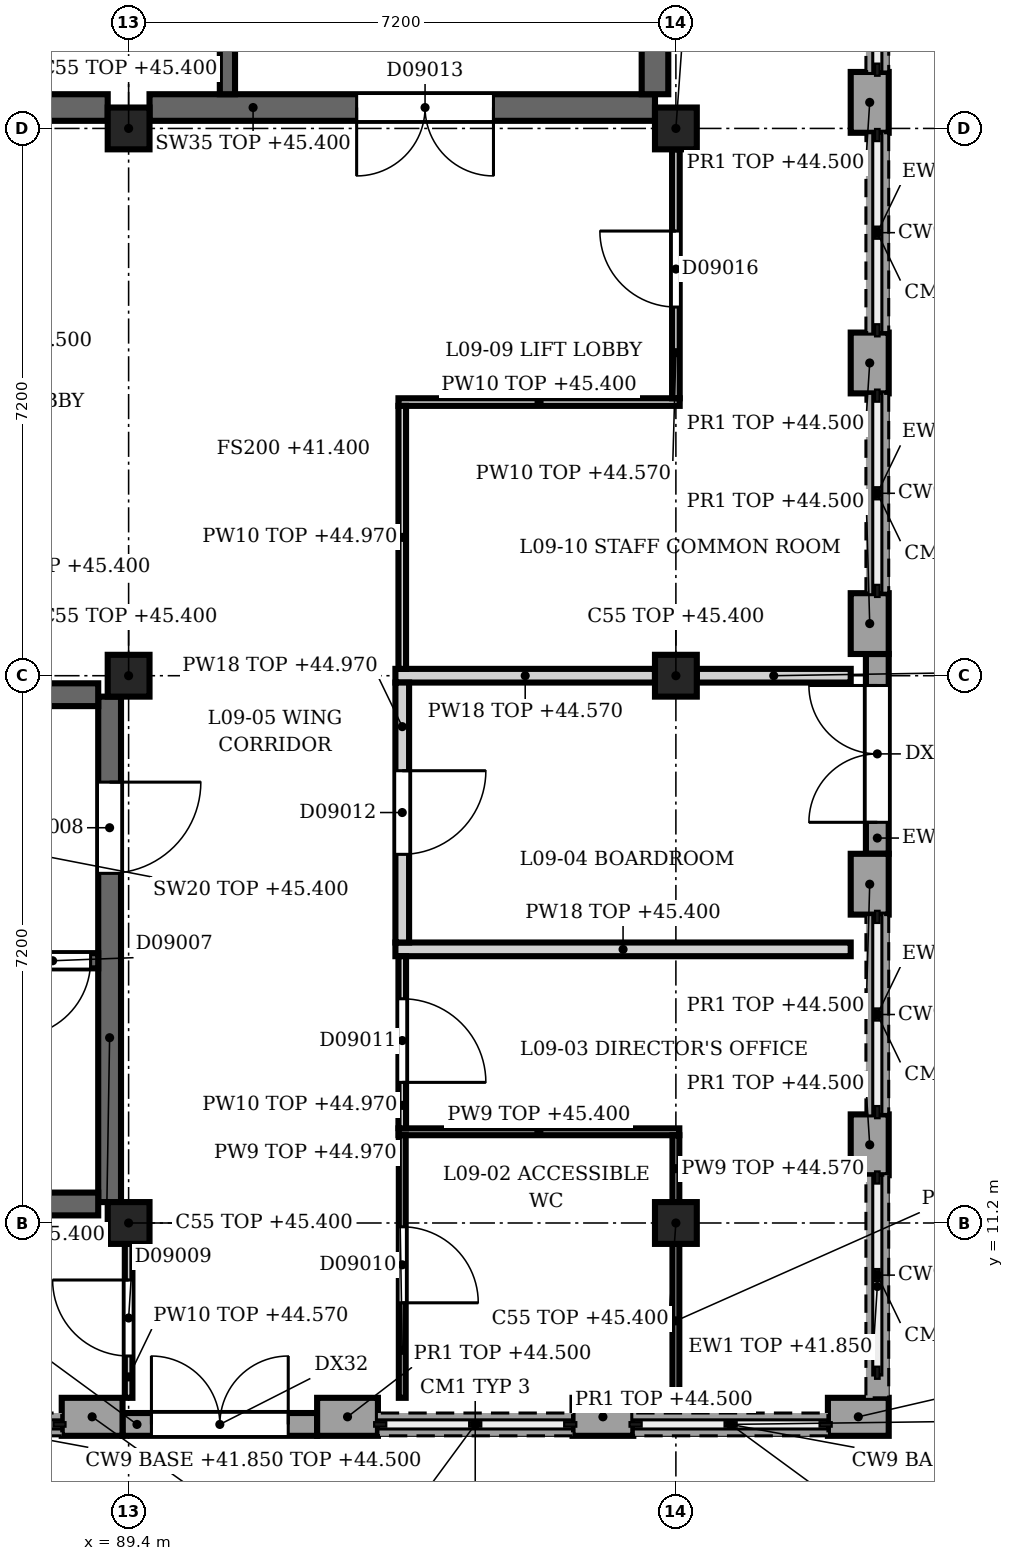
"""IFC4 building model, lengths in metres.
Left out: names, types, materials, properties, quantities, classifications, styles, units other than length and angle.
Written with IfcOpenShell. Run it as: python <this file> out.ifc"""

import sys

from ifc_helpers import new_model, si_unit, direction, frame, frame_2d, origin, origin_2d, place, context, subcontext, project, spatial, rectangle, extrude, element, fill, save


model = new_model("IFC4")
c1 = context("Model", 3, precision=1e-05, world=origin(), true_north=direction((0.0, 1.0)))
c2 = subcontext(c1, "Body", "Model", "MODEL_VIEW")
j1 = project(units=[si_unit("LENGTHUNIT", "METRE"), si_unit("PLANEANGLEUNIT", "RADIAN")], contexts=[c1])
p1 = place(None, origin())
s1 = spatial("IfcSite", under=j1, at=p1, CompositionType="ELEMENT")
p2 = place(p1, origin())
s2 = spatial("IfcBuilding", under=s1, at=p2, CompositionType="ELEMENT")
p3 = place(p2, frame((0.0, 0.0, 41.4)))
s3 = spatial("IfcBuildingStorey", under=s2, at=p3, CompositionType="ELEMENT", Elevation=41.4)
for number, where, z_axis, x_axis in (
    (1, (89.4, 11.2, 0.0), (0.0, 0.0, 1.0), (1.0, 0.0, 0.0)),
    (2, (89.4, 18.4, 0.0), (0.0, 0.0, 1.0), (1.0, 0.0, 0.0)),
    (3, (89.4, 25.6, 0.0), (0.0, 0.0, 1.0), (1.0, 0.0, 0.0)),
    (4, (96.6, 11.2, 0.0), (0.0, 0.0, 1.0), (1.0, 0.0, 0.0)),
    (5, (96.6, 18.4, 0.0), (0.0, 0.0, 1.0), (1.0, 0.0, 0.0)),
    (6, (96.6, 25.6, 0.0), (0.0, 0.0, 1.0), (1.0, 0.0, 0.0)),
):
    element("IfcColumn", number, at=place(p3, frame(where, z_axis=z_axis, x_axis=x_axis)), inside=s3, PredefinedType="COLUMN", context=c2, shape_type="SweptSolid", body=[
        extrude(rectangle(XDim=0.55, YDim=0.55, at=origin_2d()), origin(), (0.0, 0.0, 1.0), 4.0),
    ])
for number, where, z_axis, x_axis in (
    (7, (99.15, 26.343, 0.0), (0.0, 0.0, 1.0), (0.0, -1.0, 0.0)),
    (8, (99.15, 22.914, 0.0), (0.0, 0.0, 1.0), (0.0, -1.0, 0.0)),
):
    element("IfcWall", number, at=place(p3, frame(where, z_axis=z_axis, x_axis=x_axis)), inside=s3, PredefinedType="SOLIDWALL", context=c2, shape_type="SweptSolid", body=[
        extrude(rectangle(XDim=0.8, YDim=0.5, at=frame_2d((0.4, 0.0))), origin(), (0.0, 0.0, 1.0), 3.1),
    ])
p4 = place(p3, frame((99.15, 19.486, 0.0), z_axis=(0.0, 0.0, 1.0), x_axis=(0.0, -1.0, 0.0)))
e9 = element("IfcWall", 9, at=p4, inside=s3, PredefinedType="SOLIDWALL", context=c2, shape_type="SweptSolid", body=[
    extrude(rectangle(XDim=0.8, YDim=0.5, at=frame_2d((0.4, 0.0))), origin(), (0.0, 0.0, 1.0), 3.1),
])
for number, where, z_axis, x_axis in (
    (10, (99.15, 16.057, 0.0), (0.0, 0.0, 1.0), (0.0, -1.0, 0.0)),
    (11, (99.15, 12.629, 0.0), (0.0, 0.0, 1.0), (0.0, -1.0, 0.0)),
):
    element("IfcWall", number, at=place(p3, frame(where, z_axis=z_axis, x_axis=x_axis)), inside=s3, PredefinedType="SOLIDWALL", context=c2, shape_type="SweptSolid", body=[
        extrude(rectangle(XDim=0.8, YDim=0.5, at=frame_2d((0.4, 0.0))), origin(), (0.0, 0.0, 1.0), 3.1),
    ])
p5 = place(p3, frame((99.25, 28.971, 0.0), z_axis=(0.0, 0.0, 1.0), x_axis=(0.0, -1.0, 0.0)))
e12 = element("IfcWall", 12, at=p5, inside=s3, PredefinedType="SOLIDWALL", context=c2, shape_type="SweptSolid", body=[
    extrude(rectangle(XDim=2.628, YDim=0.3, at=frame_2d((1.314, 0.0))), origin(), (0.0, 0.0, 1.0), 0.45),
])
for number, where, z_axis, x_axis in (
    (13, (99.25, 25.543, 0.0), (0.0, 0.0, 1.0), (0.0, -1.0, 0.0)),
    (14, (99.25, 22.114, 0.0), (0.0, 0.0, 1.0), (0.0, -1.0, 0.0)),
):
    element("IfcWall", number, at=place(p3, frame(where, z_axis=z_axis, x_axis=x_axis)), inside=s3, PredefinedType="SOLIDWALL", context=c2, shape_type="SweptSolid", body=[
        extrude(rectangle(XDim=2.629, YDim=0.3, at=frame_2d((1.314, 0.0))), origin(), (0.0, 0.0, 1.0), 0.45),
    ])
p6 = place(p3, frame((99.25, 18.686, 0.0), z_axis=(0.0, 0.0, 1.0), x_axis=(0.0, -1.0, 0.0)))
e15 = element("IfcWall", 15, at=p6, inside=s3, PredefinedType="SOLIDWALL", context=c2, shape_type="SweptSolid", body=[
    extrude(rectangle(XDim=2.629, YDim=0.3, at=frame_2d((1.314, 0.0))), origin(), (0.0, 0.0, 1.0), 3.1),
])
p7 = place(p6, frame((0.414, 0.0, 0.0)))
e16 = element("IfcOpeningElement", 16, at=p7, cuts=e15, PredefinedType="OPENING", context=c2, shape_type="SweptSolid", body=[
    extrude(rectangle(XDim=1.8, YDim=2.4, at=frame_2d((0.9, 1.2))), frame((0.0, 0.16, 0.0), z_axis=(0.0, -1.0, 0.0), x_axis=(1.0, 0.0, 0.0)), (0.0, 0.0, 1.0), 0.32),
])
p8 = place(p3, frame((99.25, 15.257, 0.0), z_axis=(0.0, 0.0, 1.0), x_axis=(0.0, -1.0, 0.0)))
e17 = element("IfcWall", 17, at=p8, inside=s3, PredefinedType="SOLIDWALL", context=c2, shape_type="SweptSolid", body=[
    extrude(rectangle(XDim=2.628, YDim=0.3, at=frame_2d((1.314, 0.0))), origin(), (0.0, 0.0, 1.0), 0.45),
])
p9 = place(p3, frame((99.25, 11.829, 0.0), z_axis=(0.0, 0.0, 1.0), x_axis=(0.0, -1.0, 0.0)))
e18 = element("IfcWall", 18, at=p9, inside=s3, PredefinedType="SOLIDWALL", context=c2, shape_type="SweptSolid", body=[
    extrude(rectangle(XDim=2.929, YDim=0.3, at=frame_2d((1.464, 0.0))), origin(), (0.0, 0.0, 1.0), 0.45),
])
p10 = place(p3, frame((99.4, 8.65, 0.0), z_axis=(0.0, 0.0, 1.0), x_axis=(-1.0, 0.0, 0.0)))
e19 = element("IfcWall", 19, at=p10, inside=s3, PredefinedType="SOLIDWALL", context=c2, shape_type="SweptSolid", body=[
    extrude(rectangle(XDim=0.8, YDim=0.5, at=frame_2d((0.4, 0.0))), origin(), (0.0, 0.0, 1.0), 3.1),
])
for number, where, z_axis, x_axis in (
    (20, (96.04, 8.65, 0.0), (0.0, 0.0, 1.0), (-1.0, 0.0, 0.0)),
    (21, (92.68, 8.65, 0.0), (0.0, 0.0, 1.0), (-1.0, 0.0, 0.0)),
    (22, (89.32, 8.65, 0.0), (0.0, 0.0, 1.0), (-1.0, 0.0, 0.0)),
):
    element("IfcWall", number, at=place(p3, frame(where, z_axis=z_axis, x_axis=x_axis)), inside=s3, PredefinedType="SOLIDWALL", context=c2, shape_type="SweptSolid", body=[
        extrude(rectangle(XDim=0.8, YDim=0.5, at=frame_2d((0.4, 0.0))), origin(), (0.0, 0.0, 1.0), 3.1),
    ])
for number, where, z_axis, x_axis in (
    (23, (98.6, 8.55, 0.0), (0.0, 0.0, 1.0), (-1.0, 0.0, 0.0)),
    (24, (95.24, 8.55, 0.0), (0.0, 0.0, 1.0), (-1.0, 0.0, 0.0)),
):
    element("IfcWall", number, at=place(p3, frame(where, z_axis=z_axis, x_axis=x_axis)), inside=s3, PredefinedType="SOLIDWALL", context=c2, shape_type="SweptSolid", body=[
        extrude(rectangle(XDim=2.56, YDim=0.3, at=frame_2d((1.28, 0.0))), origin(), (0.0, 0.0, 1.0), 0.45),
    ])
p11 = place(p3, frame((91.88, 8.55, 0.0), z_axis=(0.0, 0.0, 1.0), x_axis=(-1.0, 0.0, 0.0)))
e25 = element("IfcWall", 25, at=p11, inside=s3, PredefinedType="SOLIDWALL", context=c2, shape_type="SweptSolid", body=[
    extrude(rectangle(XDim=2.56, YDim=0.3, at=frame_2d((1.28, 0.0))), origin(), (0.0, 0.0, 1.0), 3.1),
])
p12 = place(p11, frame((0.38, 0.0, 0.0)))
e26 = element("IfcOpeningElement", 26, at=p12, cuts=e25, PredefinedType="OPENING", context=c2, shape_type="SweptSolid", body=[
    extrude(rectangle(XDim=1.8, YDim=2.4, at=frame_2d((0.9, 1.2))), frame((0.0, 0.16, 0.0), z_axis=(0.0, -1.0, 0.0), x_axis=(1.0, 0.0, 0.0)), (0.0, 0.0, 1.0), 0.32),
])
p13 = place(p3, frame((88.52, 8.55, 0.0), z_axis=(0.0, 0.0, 1.0), x_axis=(-1.0, 0.0, 0.0)))
e27 = element("IfcWall", 27, at=p13, inside=s3, PredefinedType="SOLIDWALL", context=c2, shape_type="SweptSolid", body=[
    extrude(rectangle(XDim=2.56, YDim=0.3, at=frame_2d((1.28, 0.0))), origin(), (0.0, 0.0, 1.0), 0.45),
])
p14 = place(p3, frame((82.35, 25.875, 0.0), z_axis=(0.0, 0.0, 1.0), x_axis=(1.0, 0.0, 0.0)))
e28 = element("IfcWall", 28, at=p14, inside=s3, PredefinedType="SHEAR", context=c2, shape_type="SweptSolid", body=[
    extrude(rectangle(XDim=6.775, YDim=0.35, at=frame_2d((3.387, 0.0))), origin(), (0.0, 0.0, 1.0), 4.0),
])
p15 = place(p14, frame((4.05, 0.0, 0.0)))
e29 = element("IfcOpeningElement", 29, at=p15, cuts=e28, PredefinedType="OPENING", context=c2, shape_type="SweptSolid", body=[
    extrude(rectangle(XDim=1.2, YDim=2.1, at=frame_2d((0.6, 1.05))), frame((0.0, 0.185, 0.0), z_axis=(0.0, -1.0, 0.0), x_axis=(1.0, 0.0, 0.0)), (0.0, 0.0, 1.0), 0.37),
])
p16 = place(p3, frame((89.675, 25.875, 0.0), z_axis=(0.0, 0.0, 1.0), x_axis=(1.0, 0.0, 0.0)))
e30 = element("IfcWall", 30, at=p16, inside=s3, PredefinedType="SHEAR", context=c2, shape_type="SweptSolid", body=[
    extrude(rectangle(XDim=6.65, YDim=0.35, at=frame_2d((3.325, 0.0))), origin(), (0.0, 0.0, 1.0), 4.0),
])
p17 = place(p16, frame((2.725, 0.0, 0.0)))
e31 = element("IfcOpeningElement", 31, at=p17, cuts=e30, PredefinedType="OPENING", context=c2, shape_type="SweptSolid", body=[
    extrude(rectangle(XDim=1.8, YDim=2.1, at=frame_2d((0.9, 1.05))), frame((0.0, 0.185, 0.0), z_axis=(0.0, -1.0, 0.0), x_axis=(1.0, 0.0, 0.0)), (0.0, 0.0, 1.0), 0.37),
])
p18 = place(p3, frame((96.325, 26.05, 0.0), z_axis=(0.0, 0.0, 1.0), x_axis=(0.0, 1.0, 0.0)))
e32 = element("IfcWall", 32, at=p18, inside=s3, PredefinedType="SHEAR", context=c2, shape_type="SweptSolid", body=[
    extrude(rectangle(XDim=6.3, YDim=0.35, at=frame_2d((3.15, 0.0))), origin(), (0.0, 0.0, 1.0), 4.0),
])
p19 = place(p3, frame((90.7, 26.05, 0.0), z_axis=(0.0, 0.0, 1.0), x_axis=(0.0, 1.0, 0.0)))
e33 = element("IfcWall", 33, at=p19, inside=s3, PredefinedType="SHEAR", context=c2, shape_type="SweptSolid", body=[
    extrude(rectangle(XDim=3.05, YDim=0.2, at=frame_2d((1.525, 0.0))), origin(), (0.0, 0.0, 1.0), 4.0),
])
p20 = place(p3, frame((89.15, 11.475, 0.0), z_axis=(0.0, 0.0, 1.0), x_axis=(0.0, 1.0, 0.0)))
e34 = element("IfcWall", 34, at=p20, inside=s3, PredefinedType="SHEAR", context=c2, shape_type="SweptSolid", body=[
    extrude(rectangle(XDim=6.65, YDim=0.3, at=frame_2d((3.325, 0.0))), origin(), (0.0, 0.0, 1.0), 4.0),
])
p21 = place(p20, frame((4.325, 0.0, 0.0)))
e35 = element("IfcOpeningElement", 35, at=p21, cuts=e34, PredefinedType="OPENING", context=c2, shape_type="SweptSolid", body=[
    extrude(rectangle(XDim=1.2, YDim=2.1, at=frame_2d((0.6, 1.05))), frame((0.0, 0.16, 0.0), z_axis=(0.0, -1.0, 0.0), x_axis=(1.0, 0.0, 0.0)), (0.0, 0.0, 1.0), 0.32),
])
for number, where, z_axis, x_axis in (
    (36, (82.6, 11.45, 0.0), (0.0, 0.0, 1.0), (1.0, 0.0, 0.0)),
    (37, (82.6, 18.15, 0.0), (0.0, 0.0, 1.0), (1.0, 0.0, 0.0)),
):
    element("IfcWall", number, at=place(p3, frame(where, z_axis=z_axis, x_axis=x_axis)), inside=s3, PredefinedType="SHEAR", context=c2, shape_type="SweptSolid", body=[
        extrude(rectangle(XDim=6.4, YDim=0.3, at=frame_2d((3.2, 0.0))), origin(), (0.0, 0.0, 1.0), 4.0),
    ])
p22 = place(p3, frame((89.0, 14.65, 0.0), z_axis=(0.0, 0.0, 1.0), x_axis=(-1.0, 0.0, 0.0)))
e38 = element("IfcWall", 38, at=p22, inside=s3, PredefinedType="SHEAR", context=c2, shape_type="SweptSolid", body=[
    extrude(rectangle(XDim=6.4, YDim=0.2, at=frame_2d((3.2, 0.0))), origin(), (0.0, 0.0, 1.0), 4.0),
])
p23 = place(p22, frame((0.1, 0.0, 0.0)))
e39 = element("IfcOpeningElement", 39, at=p23, cuts=e38, PredefinedType="OPENING", context=c2, shape_type="SweptSolid", body=[
    extrude(rectangle(XDim=1.0, YDim=2.1, at=frame_2d((0.5, 1.05))), frame((0.0, 0.11, 0.0), z_axis=(0.0, -1.0, 0.0), x_axis=(1.0, 0.0, 0.0)), (0.0, 0.0, 1.0), 0.22),
])
p24 = place(p3, frame((92.95, 12.4, 0.0), z_axis=(0.0, 0.0, 1.0), x_axis=(1.0, 0.0, 0.0)))
e40 = element("IfcWall", 40, at=p24, inside=s3, PredefinedType="PARTITIONING", context=c2, shape_type="SweptSolid", body=[
    extrude(rectangle(XDim=3.695, YDim=0.09, at=frame_2d((1.848, 0.0))), origin(), (0.0, 0.0, 1.0), 4.0),
])
p25 = place(p3, frame((92.91, 14.8, 0.0), z_axis=(0.0, 0.0, 1.0), x_axis=(1.0, 0.0, 0.0)))
e41 = element("IfcWall", 41, at=p25, inside=s3, PredefinedType="PARTITIONING", context=c2, shape_type="SweptSolid", body=[
    extrude(rectangle(XDim=5.99, YDim=0.18, at=frame_2d((2.995, 0.0))), origin(), (0.0, 0.0, 1.0), 4.0),
])
p26 = place(p3, frame((92.91, 18.4, 0.0), z_axis=(0.0, 0.0, 1.0), x_axis=(1.0, 0.0, 0.0)))
e42 = element("IfcWall", 42, at=p26, inside=s3, PredefinedType="PARTITIONING", context=c2, shape_type="SweptSolid", body=[
    extrude(rectangle(XDim=3.415, YDim=0.18, at=frame_2d((1.708, 0.0))), origin(), (0.0, 0.0, 1.0), 3.17),
])
p27 = place(p3, frame((96.875, 18.4, 0.0), z_axis=(0.0, 0.0, 1.0), x_axis=(1.0, 0.0, 0.0)))
e43 = element("IfcWall", 43, at=p27, inside=s3, PredefinedType="PARTITIONING", context=c2, shape_type="SweptSolid", body=[
    extrude(rectangle(XDim=2.025, YDim=0.18, at=frame_2d((1.012, 0.0))), origin(), (0.0, 0.0, 1.0), 3.17),
])
p28 = place(p3, frame((92.95, 22.0, 0.0), z_axis=(0.0, 0.0, 1.0), x_axis=(1.0, 0.0, 0.0)))
e44 = element("IfcWall", 44, at=p28, inside=s3, PredefinedType="PARTITIONING", context=c2, shape_type="SweptSolid", body=[
    extrude(rectangle(XDim=3.7, YDim=0.1, at=frame_2d((1.85, 0.0))), origin(), (0.0, 0.0, 1.0), 4.0),
])
p29 = place(p3, frame((89.4, 8.9, 0.0), z_axis=(0.0, 0.0, 1.0), x_axis=(0.0, 1.0, 0.0)))
e45 = element("IfcWall", 45, at=p29, inside=s3, PredefinedType="PARTITIONING", context=c2, shape_type="SweptSolid", body=[
    extrude(rectangle(XDim=2.025, YDim=0.1, at=frame_2d((1.013, 0.0))), origin(), (0.0, 0.0, 1.0), 3.17),
])
p30 = place(p29, frame((0.55, 0.0, 0.0)))
e46 = element("IfcOpeningElement", 46, at=p30, cuts=e45, PredefinedType="OPENING", context=c2, shape_type="SweptSolid", body=[
    extrude(rectangle(XDim=1.0, YDim=2.1, at=frame_2d((0.5, 1.05))), frame((0.0, 0.06, 0.0), z_axis=(0.0, -1.0, 0.0), x_axis=(1.0, 0.0, 0.0)), (0.0, 0.0, 1.0), 0.12),
])
p31 = place(p3, frame((93.0, 12.355, 0.0), z_axis=(0.0, 0.0, 1.0), x_axis=(0.0, -1.0, 0.0)))
e47 = element("IfcWall", 47, at=p31, inside=s3, PredefinedType="PARTITIONING", context=c2, shape_type="SweptSolid", body=[
    extrude(rectangle(XDim=3.455, YDim=0.09, at=frame_2d((1.728, 0.0))), origin(), (0.0, 0.0, 1.0), 3.57),
])
p32 = place(p31, frame((1.205, 0.0, 0.0)))
e48 = element("IfcOpeningElement", 48, at=p32, cuts=e47, PredefinedType="OPENING", context=c2, shape_type="SweptSolid", body=[
    extrude(rectangle(XDim=1.0, YDim=2.2, at=frame_2d((0.5, 1.1))), frame((0.0, 0.055, 0.0), z_axis=(0.0, -1.0, 0.0), x_axis=(1.0, 0.0, 0.0)), (0.0, 0.0, 1.0), 0.11),
])
p33 = place(p3, frame((93.0, 14.71, 0.0), z_axis=(0.0, 0.0, 1.0), x_axis=(0.0, -1.0, 0.0)))
e49 = element("IfcWall", 49, at=p33, inside=s3, PredefinedType="PARTITIONING", context=c2, shape_type="SweptSolid", body=[
    extrude(rectangle(XDim=2.265, YDim=0.1, at=frame_2d((1.132, 0.0))), origin(), (0.0, 0.0, 1.0), 3.57),
])
p34 = place(p33, frame((0.56, 0.0, 0.0)))
e50 = element("IfcOpeningElement", 50, at=p34, cuts=e49, PredefinedType="OPENING", context=c2, shape_type="SweptSolid", body=[
    extrude(rectangle(XDim=1.1, YDim=2.1, at=frame_2d((0.55, 1.05))), frame((0.0, 0.06, 0.0), z_axis=(0.0, -1.0, 0.0), x_axis=(1.0, 0.0, 0.0)), (0.0, 0.0, 1.0), 0.12),
])
p35 = place(p3, frame((93.0, 18.31, 0.0), z_axis=(0.0, 0.0, 1.0), x_axis=(0.0, -1.0, 0.0)))
e51 = element("IfcWall", 51, at=p35, inside=s3, PredefinedType="PARTITIONING", context=c2, shape_type="SweptSolid", body=[
    extrude(rectangle(XDim=3.42, YDim=0.18, at=frame_2d((1.71, 0.0))), origin(), (0.0, 0.0, 1.0), 3.57),
])
p36 = place(p35, frame((1.16, 0.0, 0.0)))
e52 = element("IfcOpeningElement", 52, at=p36, cuts=e51, PredefinedType="OPENING", context=c2, shape_type="SweptSolid", body=[
    extrude(rectangle(XDim=1.1, YDim=2.1, at=frame_2d((0.55, 1.05))), frame((0.0, 0.1, 0.0), z_axis=(0.0, -1.0, 0.0), x_axis=(1.0, 0.0, 0.0)), (0.0, 0.0, 1.0), 0.2),
])
p37 = place(p3, frame((93.0, 18.49, 0.0), z_axis=(0.0, 0.0, 1.0), x_axis=(0.0, 1.0, 0.0)))
e53 = element("IfcWall", 53, at=p37, inside=s3, PredefinedType="PARTITIONING", context=c2, shape_type="SweptSolid", body=[
    extrude(rectangle(XDim=3.46, YDim=0.1, at=frame_2d((1.73, 0.0))), origin(), (0.0, 0.0, 1.0), 3.57),
])
p38 = place(p3, frame((96.6, 8.9, 0.0), z_axis=(0.0, 0.0, 1.0), x_axis=(0.0, 1.0, 0.0)))
e54 = element("IfcWall", 54, at=p38, inside=s3, PredefinedType="PARTITIONING", context=c2, shape_type="SweptSolid", body=[
    extrude(rectangle(XDim=2.025, YDim=0.09, at=frame_2d((1.013, 0.0))), origin(), (0.0, 0.0, 1.0), 3.17),
])
p39 = place(p3, frame((96.6, 11.475, 0.0), z_axis=(0.0, 0.0, 1.0), x_axis=(0.0, 1.0, 0.0)))
e55 = element("IfcWall", 55, at=p39, inside=s3, PredefinedType="PARTITIONING", context=c2, shape_type="SweptSolid", body=[
    extrude(rectangle(XDim=0.88, YDim=0.09, at=frame_2d((0.44, 0.0))), origin(), (0.0, 0.0, 1.0), 3.17),
])
p40 = place(p3, frame((96.6, 25.325, 0.0), z_axis=(0.0, 0.0, 1.0), x_axis=(0.0, -1.0, 0.0)))
e56 = element("IfcWall", 56, at=p40, inside=s3, PredefinedType="PARTITIONING", context=c2, shape_type="SweptSolid", body=[
    extrude(rectangle(XDim=3.275, YDim=0.1, at=frame_2d((1.637, 0.0))), origin(), (0.0, 0.0, 1.0), 3.17),
])
p41 = place(p40, frame((1.075, 0.0, 0.0)))
e57 = element("IfcOpeningElement", 57, at=p41, cuts=e56, PredefinedType="OPENING", context=c2, shape_type="SweptSolid", body=[
    extrude(rectangle(XDim=1.0, YDim=2.1, at=frame_2d((0.5, 1.05))), frame((0.0, 0.06, 0.0), z_axis=(0.0, -1.0, 0.0), x_axis=(1.0, 0.0, 0.0)), (0.0, 0.0, 1.0), 0.12),
])
p42 = place(p7, origin())
e58 = element("IfcDoor", 58, at=p42, inside=s3, OperationType="SINGLE_SWING_LEFT", PredefinedType="DOOR", context=c2, shape_type="SweptSolid", body=[
    extrude(rectangle(XDim=1.8, YDim=2.4, at=frame_2d((0.9, 1.2))), frame((0.0, 0.025, 0.0), z_axis=(0.0, -1.0, 0.0), x_axis=(1.0, 0.0, 0.0)), (0.0, 0.0, 1.0), 0.05),
])
fill(e16, e58)
p43 = place(p12, origin())
e59 = element("IfcDoor", 59, at=p43, inside=s3, OperationType="SINGLE_SWING_LEFT", PredefinedType="DOOR", context=c2, shape_type="SweptSolid", body=[
    extrude(rectangle(XDim=1.8, YDim=2.4, at=frame_2d((0.9, 1.2))), frame((0.0, 0.025, 0.0), z_axis=(0.0, -1.0, 0.0), x_axis=(1.0, 0.0, 0.0)), (0.0, 0.0, 1.0), 0.05),
])
fill(e26, e59)
p44 = place(p17, origin())
e60 = element("IfcDoor", 60, at=p44, inside=s3, OperationType="SINGLE_SWING_LEFT", PredefinedType="DOOR", context=c2, shape_type="SweptSolid", body=[
    extrude(rectangle(XDim=1.8, YDim=2.1, at=frame_2d((0.9, 1.05))), frame((0.0, 0.025, 0.0), z_axis=(0.0, -1.0, 0.0), x_axis=(1.0, 0.0, 0.0)), (0.0, 0.0, 1.0), 0.05),
])
fill(e31, e60)
p45 = place(p21, origin())
e61 = element("IfcDoor", 61, at=p45, inside=s3, OperationType="SINGLE_SWING_RIGHT", PredefinedType="DOOR", context=c2, shape_type="SweptSolid", body=[
    extrude(rectangle(XDim=1.2, YDim=2.1, at=frame_2d((0.6, 1.05))), frame((0.0, 0.025, 0.0), z_axis=(0.0, -1.0, 0.0), x_axis=(1.0, 0.0, 0.0)), (0.0, 0.0, 1.0), 0.05),
])
fill(e35, e61)
p46 = place(p23, origin())
e62 = element("IfcDoor", 62, at=p46, inside=s3, OperationType="SINGLE_SWING_LEFT", PredefinedType="DOOR", context=c2, shape_type="SweptSolid", body=[
    extrude(rectangle(XDim=1.0, YDim=2.1, at=frame_2d((0.5, 1.05))), frame((0.0, 0.025, 0.0), z_axis=(0.0, -1.0, 0.0), x_axis=(1.0, 0.0, 0.0)), (0.0, 0.0, 1.0), 0.05),
])
fill(e39, e62)
p47 = place(p30, origin())
e63 = element("IfcDoor", 63, at=p47, inside=s3, OperationType="SINGLE_SWING_RIGHT", PredefinedType="DOOR", context=c2, shape_type="SweptSolid", body=[
    extrude(rectangle(XDim=1.0, YDim=2.1, at=frame_2d((0.5, 1.05))), frame((0.0, 0.025, 0.0), z_axis=(0.0, -1.0, 0.0), x_axis=(1.0, 0.0, 0.0)), (0.0, 0.0, 1.0), 0.05),
])
fill(e46, e63)
p48 = place(p32, origin())
e64 = element("IfcDoor", 64, at=p48, inside=s3, OperationType="SINGLE_SWING_LEFT", PredefinedType="DOOR", context=c2, shape_type="SweptSolid", body=[
    extrude(rectangle(XDim=1.0, YDim=2.2, at=frame_2d((0.5, 1.1))), frame((0.0, 0.025, 0.0), z_axis=(0.0, -1.0, 0.0), x_axis=(1.0, 0.0, 0.0)), (0.0, 0.0, 1.0), 0.05),
])
fill(e48, e64)
p49 = place(p34, origin())
e65 = element("IfcDoor", 65, at=p49, inside=s3, OperationType="SINGLE_SWING_LEFT", PredefinedType="DOOR", context=c2, shape_type="SweptSolid", body=[
    extrude(rectangle(XDim=1.1, YDim=2.1, at=frame_2d((0.55, 1.05))), frame((0.0, 0.025, 0.0), z_axis=(0.0, -1.0, 0.0), x_axis=(1.0, 0.0, 0.0)), (0.0, 0.0, 1.0), 0.05),
])
fill(e50, e65)
p50 = place(p36, origin())
e66 = element("IfcDoor", 66, at=p50, inside=s3, OperationType="SINGLE_SWING_LEFT", PredefinedType="DOOR", context=c2, shape_type="SweptSolid", body=[
    extrude(rectangle(XDim=1.1, YDim=2.1, at=frame_2d((0.55, 1.05))), frame((0.0, 0.025, 0.0), z_axis=(0.0, -1.0, 0.0), x_axis=(1.0, 0.0, 0.0)), (0.0, 0.0, 1.0), 0.05),
])
fill(e52, e66)
p51 = place(p41, origin())
e67 = element("IfcDoor", 67, at=p51, inside=s3, OperationType="SINGLE_SWING_LEFT", PredefinedType="DOOR", context=c2, shape_type="SweptSolid", body=[
    extrude(rectangle(XDim=1.0, YDim=2.1, at=frame_2d((0.5, 1.05))), frame((0.0, 0.025, 0.0), z_axis=(0.0, -1.0, 0.0), x_axis=(1.0, 0.0, 0.0)), (0.0, 0.0, 1.0), 0.05),
])
fill(e57, e67)
save(model, sys.argv[1])
